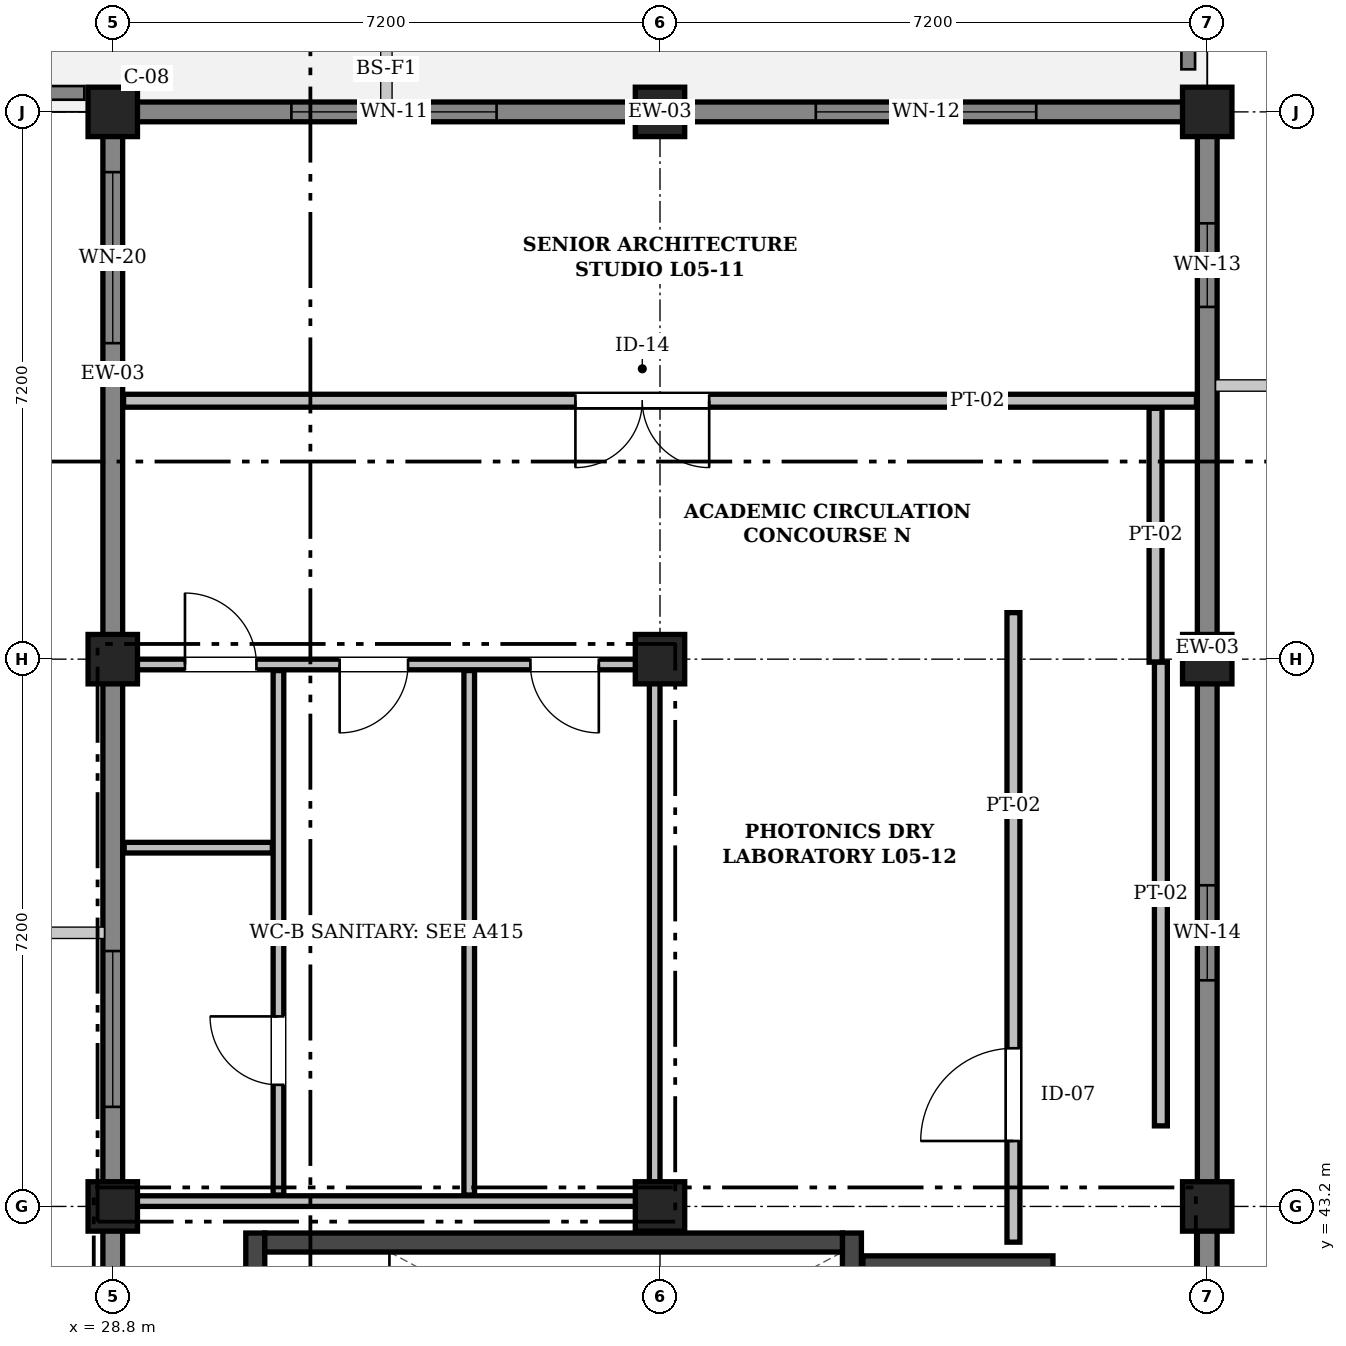
"""IFC4 building model, lengths in metres.
Left out: names, types, materials, properties, quantities, classifications, styles, units other than length and angle.
Written with IfcOpenShell. Run it as: python <this file> out.ifc"""

import sys

from ifc_helpers import new_model, si_unit, direction, frame, frame_2d, origin, origin_2d, place, context, subcontext, project, spatial, rectangle, extrude, element, fill, save


model = new_model("IFC4")
c1 = context("Model", 3, precision=1e-05, world=origin(), true_north=direction((0.0, 1.0)))
c2 = subcontext(c1, "Body", "Model", "MODEL_VIEW")
j1 = project(units=[si_unit("LENGTHUNIT", "METRE"), si_unit("PLANEANGLEUNIT", "RADIAN")], contexts=[c1])
p1 = place(None, origin())
s1 = spatial("IfcSite", under=j1, at=p1, CompositionType="ELEMENT")
p2 = place(p1, origin())
s2 = spatial("IfcBuilding", under=s1, at=p2, CompositionType="ELEMENT")
p3 = place(p2, frame((0.0, 0.0, 23.4)))
s3 = spatial("IfcBuildingStorey", under=s2, at=p3, CompositionType="ELEMENT", Elevation=23.4)
for number, where, z_axis, x_axis in (
    (1, (28.8, 43.2, 0.0), (0.0, 0.0, 1.0), (1.0, 0.0, 0.0)),
    (2, (28.8, 50.4, 0.0), (0.0, 0.0, 1.0), (1.0, 0.0, 0.0)),
    (3, (28.8, 57.6, 0.0), (0.0, 0.0, 1.0), (1.0, 0.0, 0.0)),
    (4, (36.0, 43.2, 0.0), (0.0, 0.0, 1.0), (1.0, 0.0, 0.0)),
    (5, (36.0, 50.4, 0.0), (0.0, 0.0, 1.0), (1.0, 0.0, 0.0)),
    (6, (36.0, 57.6, 0.0), (0.0, 0.0, 1.0), (1.0, 0.0, 0.0)),
    (7, (43.2, 43.2, 0.0), (0.0, 0.0, 1.0), (1.0, 0.0, 0.0)),
    (8, (43.2, 50.4, 0.0), (0.0, 0.0, 1.0), (1.0, 0.0, 0.0)),
    (9, (43.2, 57.6, 0.0), (0.0, 0.0, 1.0), (1.0, 0.0, 0.0)),
):
    element("IfcColumn", number, at=place(p3, frame(where, z_axis=z_axis, x_axis=x_axis)), inside=s3, PredefinedType="COLUMN", context=c2, shape_type="SweptSolid", body=[
        extrude(rectangle(XDim=0.65, YDim=0.65, at=origin_2d()), origin(), (0.0, 0.0, 1.0), 4.5),
    ])
p4 = place(p3, frame((28.65, 57.6, 0.0), z_axis=(0.0, 0.0, 1.0), x_axis=(1.0, 0.0, 0.0)))
e10 = element("IfcWall", 10, at=p4, inside=s3, PredefinedType="SOLIDWALL", context=c2, shape_type="SweptSolid", body=[
    extrude(rectangle(XDim=7.35, YDim=0.26, at=frame_2d((3.675, 0.0))), origin(), (0.0, 0.0, 1.0), 4.22),
])
p5 = place(p4, frame((2.5, 0.0, 0.95)))
e11 = element("IfcOpeningElement", 11, at=p5, cuts=e10, PredefinedType="OPENING", context=c2, shape_type="SweptSolid", body=[
    extrude(rectangle(XDim=2.7, YDim=1.3, at=frame_2d((1.35, 0.65))), frame((0.0, 0.142, 0.0), z_axis=(0.0, -1.0, 0.0), x_axis=(1.0, 0.0, 0.0)), (0.0, 0.0, 1.0), 0.284),
])
p6 = place(p3, frame((36.0, 57.6, 0.0), z_axis=(0.0, 0.0, 1.0), x_axis=(1.0, 0.0, 0.0)))
e12 = element("IfcWall", 12, at=p6, inside=s3, PredefinedType="SOLIDWALL", context=c2, shape_type="SweptSolid", body=[
    extrude(rectangle(XDim=7.35, YDim=0.26, at=frame_2d((3.675, 0.0))), origin(), (0.0, 0.0, 1.0), 4.22),
])
p7 = place(p6, frame((2.05, 0.0, 0.95)))
e13 = element("IfcOpeningElement", 13, at=p7, cuts=e12, PredefinedType="OPENING", context=c2, shape_type="SweptSolid", body=[
    extrude(rectangle(XDim=2.9, YDim=1.3, at=frame_2d((1.45, 0.65))), frame((0.0, 0.142, 0.0), z_axis=(0.0, -1.0, 0.0), x_axis=(1.0, 0.0, 0.0)), (0.0, 0.0, 1.0), 0.284),
])
p8 = place(p3, frame((43.2, 57.448, 0.0), z_axis=(0.0, 0.0, 1.0), x_axis=(0.0, -1.0, 0.0)))
e14 = element("IfcWall", 14, at=p8, inside=s3, PredefinedType="SOLIDWALL", context=c2, shape_type="SweptSolid", body=[
    extrude(rectangle(XDim=7.048, YDim=0.26, at=frame_2d((3.524, 0.0))), origin(), (0.0, 0.0, 1.0), 4.22),
])
p9 = place(p8, frame((1.314, 0.0, 0.95)))
e15 = element("IfcOpeningElement", 15, at=p9, cuts=e14, PredefinedType="OPENING", context=c2, shape_type="SweptSolid", body=[
    extrude(rectangle(XDim=1.1, YDim=1.55, at=frame_2d((0.55, 0.775))), frame((0.0, 0.142, 0.0), z_axis=(0.0, -1.0, 0.0), x_axis=(1.0, 0.0, 0.0)), (0.0, 0.0, 1.0), 0.284),
])
p10 = place(p3, frame((43.2, 50.4, 0.0), z_axis=(0.0, 0.0, 1.0), x_axis=(0.0, -1.0, 0.0)))
e16 = element("IfcWall", 16, at=p10, inside=s3, PredefinedType="SOLIDWALL", context=c2, shape_type="SweptSolid", body=[
    extrude(rectangle(XDim=7.2, YDim=0.26, at=frame_2d((3.6, 0.0))), origin(), (0.0, 0.0, 1.0), 4.22),
])
p11 = place(p10, frame((2.975, 0.0, 0.95)))
e17 = element("IfcOpeningElement", 17, at=p11, cuts=e16, PredefinedType="OPENING", context=c2, shape_type="SweptSolid", body=[
    extrude(rectangle(XDim=1.25, YDim=1.55, at=frame_2d((0.625, 0.775))), frame((0.0, 0.142, 0.0), z_axis=(0.0, -1.0, 0.0), x_axis=(1.0, 0.0, 0.0)), (0.0, 0.0, 1.0), 0.284),
])
p12 = place(p3, frame((43.2, 43.2, 0.0), z_axis=(0.0, 0.0, 1.0), x_axis=(0.0, -1.0, 0.0)))
e18 = element("IfcWall", 18, at=p12, inside=s3, PredefinedType="SOLIDWALL", context=c2, shape_type="SweptSolid", body=[
    extrude(rectangle(XDim=7.2, YDim=0.26, at=frame_2d((3.6, 0.0))), origin(), (0.0, 0.0, 1.0), 4.22),
])
p13 = place(p12, frame((2.9, 0.0, 0.95)))
e19 = element("IfcOpeningElement", 19, at=p13, cuts=e18, PredefinedType="OPENING", context=c2, shape_type="SweptSolid", body=[
    extrude(rectangle(XDim=1.4, YDim=1.55, at=frame_2d((0.7, 0.775))), frame((0.0, 0.142, 0.0), z_axis=(0.0, -1.0, 0.0), x_axis=(1.0, 0.0, 0.0)), (0.0, 0.0, 1.0), 0.284),
])
p14 = place(p3, frame((28.8, 36.0, 0.0), z_axis=(0.0, 0.0, 1.0), x_axis=(0.0, 1.0, 0.0)))
e20 = element("IfcWall", 20, at=p14, inside=s3, PredefinedType="SOLIDWALL", context=c2, shape_type="SweptSolid", body=[
    extrude(rectangle(XDim=7.2, YDim=0.26, at=frame_2d((3.6, 0.0))), origin(), (0.0, 0.0, 1.0), 4.22),
])
p15 = place(p14, frame((2.94, 0.0, 0.0)))
e21 = element("IfcOpeningElement", 21, at=p15, cuts=e20, PredefinedType="OPENING", context=c2, shape_type="SweptSolid", body=[
    extrude(rectangle(XDim=1.32, YDim=2.2, at=frame_2d((0.66, 1.1))), frame((0.0, 0.142, 0.0), z_axis=(0.0, -1.0, 0.0), x_axis=(1.0, 0.0, 0.0)), (0.0, 0.0, 1.0), 0.284),
])
p16 = place(p3, frame((28.8, 43.2, 0.0), z_axis=(0.0, 0.0, 1.0), x_axis=(0.0, 1.0, 0.0)))
e22 = element("IfcWall", 22, at=p16, inside=s3, PredefinedType="SOLIDWALL", context=c2, shape_type="SweptSolid", body=[
    extrude(rectangle(XDim=7.2, YDim=0.26, at=frame_2d((3.6, 0.0))), origin(), (0.0, 0.0, 1.0), 4.22),
])
p17 = place(p16, frame((1.31, 0.0, 0.95)))
e23 = element("IfcOpeningElement", 23, at=p17, cuts=e22, PredefinedType="OPENING", context=c2, shape_type="SweptSolid", body=[
    extrude(rectangle(XDim=2.05, YDim=1.55, at=frame_2d((1.025, 0.775))), frame((0.0, 0.142, 0.0), z_axis=(0.0, -1.0, 0.0), x_axis=(1.0, 0.0, 0.0)), (0.0, 0.0, 1.0), 0.284),
])
p18 = place(p3, frame((28.8, 50.4, 0.0), z_axis=(0.0, 0.0, 1.0), x_axis=(0.0, 1.0, 0.0)))
e24 = element("IfcWall", 24, at=p18, inside=s3, PredefinedType="SOLIDWALL", context=c2, shape_type="SweptSolid", body=[
    extrude(rectangle(XDim=7.048, YDim=0.26, at=frame_2d((3.524, 0.0))), origin(), (0.0, 0.0, 1.0), 4.22),
])
p19 = place(p18, frame((4.157, 0.0, 0.95)))
e25 = element("IfcOpeningElement", 25, at=p19, cuts=e24, PredefinedType="OPENING", context=c2, shape_type="SweptSolid", body=[
    extrude(rectangle(XDim=2.25, YDim=1.55, at=frame_2d((1.125, 0.775))), frame((0.0, 0.142, 0.0), z_axis=(0.0, -1.0, 0.0), x_axis=(1.0, 0.0, 0.0)), (0.0, 0.0, 1.0), 0.284),
])
p20 = place(p3, frame((42.95, 65.496, 0.0), z_axis=(0.0, 0.0, 1.0), x_axis=(0.0, -1.0, 0.0)))
e26 = element("IfcWall", 26, at=p20, inside=s3, PredefinedType="PARAPET", context=c2, shape_type="SweptSolid", body=[
    extrude(rectangle(XDim=7.336, YDim=0.18, at=frame_2d((3.668, 0.0))), origin(), (0.0, 0.0, 1.0), 0.95),
])
p21 = place(p3, frame((28.426, 57.85, 0.0), z_axis=(0.0, 0.0, 1.0), x_axis=(-1.0, 0.0, 0.0)))
e27 = element("IfcWall", 27, at=p21, inside=s3, PredefinedType="PARAPET", context=c2, shape_type="SweptSolid", body=[
    extrude(rectangle(XDim=2.976, YDim=0.18, at=frame_2d((1.488, 0.0))), origin(), (0.0, 0.0, 1.0), 0.95),
])
p22 = place(p3, frame((38.67, 42.4, 0.0), z_axis=(0.0, 0.0, 1.0), x_axis=(1.0, 0.0, 0.0)))
e28 = element("IfcWall", 28, at=p22, inside=s3, PredefinedType="SHEAR", context=c2, shape_type="SweptSolid", body=[
    extrude(rectangle(XDim=2.5, YDim=0.3, at=frame_2d((1.25, 0.0))), origin(), (0.0, 0.0, 1.0), 5.49),
])
p23 = place(p3, frame((30.675, 39.15, 0.0), z_axis=(0.0, 0.0, 1.0), x_axis=(0.0, 1.0, 0.0)))
e29 = element("IfcWall", 29, at=p23, inside=s3, PredefinedType="SHEAR", context=c2, shape_type="SweptSolid", body=[
    extrude(rectangle(XDim=3.7, YDim=0.25, at=frame_2d((1.85, 0.0))), origin(), (0.0, 0.0, 1.0), 4.25),
])
p24 = place(p23, frame((1.25, 0.0, 0.0)))
e30 = element("IfcOpeningElement", 30, at=p24, cuts=e29, PredefinedType="OPENING", context=c2, shape_type="SweptSolid", body=[
    extrude(rectangle(XDim=1.2, YDim=2.15, at=frame_2d((0.6, 1.075))), frame((0.0, 0.137, 0.0), z_axis=(0.0, -1.0, 0.0), x_axis=(1.0, 0.0, 0.0)), (0.0, 0.0, 1.0), 0.274),
])
p25 = place(p3, frame((38.525, 39.15, 0.0), z_axis=(0.0, 0.0, 1.0), x_axis=(0.0, 1.0, 0.0)))
e31 = element("IfcWall", 31, at=p25, inside=s3, PredefinedType="SHEAR", context=c2, shape_type="SweptSolid", body=[
    extrude(rectangle(XDim=3.7, YDim=0.25, at=frame_2d((1.85, 0.0))), origin(), (0.0, 0.0, 1.0), 4.25),
])
p26 = place(p3, frame((30.8, 42.725, 0.0), z_axis=(0.0, 0.0, 1.0), x_axis=(1.0, 0.0, 0.0)))
e32 = element("IfcWall", 32, at=p26, inside=s3, PredefinedType="SHEAR", context=c2, shape_type="SweptSolid", body=[
    extrude(rectangle(XDim=7.6, YDim=0.25, at=frame_2d((3.8, 0.0))), origin(), (0.0, 0.0, 1.0), 4.25),
])
p27 = place(p3, frame((29.0, 43.27, 0.0), z_axis=(0.0, 0.0, 1.0), x_axis=(1.0, 0.0, 0.0)))
e33 = element("IfcWall", 33, at=p27, inside=s3, PredefinedType="PARTITIONING", context=c2, shape_type="SweptSolid", body=[
    extrude(rectangle(XDim=6.93, YDim=0.14, at=frame_2d((3.465, 0.0))), origin(), (0.0, 0.0, 1.0), 3.73),
])
p28 = place(p3, frame((29.0, 50.33, 0.0), z_axis=(0.0, 0.0, 1.0), x_axis=(1.0, 0.0, 0.0)))
e34 = element("IfcWall", 34, at=p28, inside=s3, PredefinedType="PARTITIONING", context=c2, shape_type="SweptSolid", body=[
    extrude(rectangle(XDim=6.93, YDim=0.14, at=frame_2d((3.465, 0.0))), origin(), (0.0, 0.0, 1.0), 3.73),
])
p29 = place(p28, frame((0.75, 0.0, 0.0)))
e35 = element("IfcOpeningElement", 35, at=p29, cuts=e34, PredefinedType="OPENING", context=c2, shape_type="SweptSolid", body=[
    extrude(rectangle(XDim=0.94, YDim=2.1, at=frame_2d((0.47, 1.05))), frame((0.0, 0.082, 0.0), z_axis=(0.0, -1.0, 0.0), x_axis=(1.0, 0.0, 0.0)), (0.0, 0.0, 1.0), 0.164),
])
p30 = place(p28, frame((2.785, 0.0, 0.0)))
e36 = element("IfcOpeningElement", 36, at=p30, cuts=e34, PredefinedType="OPENING", context=c2, shape_type="SweptSolid", body=[
    extrude(rectangle(XDim=0.9, YDim=2.08, at=frame_2d((0.45, 1.04))), frame((0.0, 0.082, 0.0), z_axis=(0.0, -1.0, 0.0), x_axis=(1.0, 0.0, 0.0)), (0.0, 0.0, 1.0), 0.164),
])
p31 = place(p28, frame((5.295, 0.0, 0.0)))
e37 = element("IfcOpeningElement", 37, at=p31, cuts=e34, PredefinedType="OPENING", context=c2, shape_type="SweptSolid", body=[
    extrude(rectangle(XDim=0.9, YDim=2.08, at=frame_2d((0.45, 1.04))), frame((0.0, 0.082, 0.0), z_axis=(0.0, -1.0, 0.0), x_axis=(1.0, 0.0, 0.0)), (0.0, 0.0, 1.0), 0.164),
])
p32 = place(p3, frame((35.93, 43.35, 0.0), z_axis=(0.0, 0.0, 1.0), x_axis=(0.0, 1.0, 0.0)))
e38 = element("IfcWall", 38, at=p32, inside=s3, PredefinedType="PARTITIONING", context=c2, shape_type="SweptSolid", body=[
    extrude(rectangle(XDim=6.9, YDim=0.14, at=frame_2d((3.45, 0.0))), origin(), (0.0, 0.0, 1.0), 3.73),
])
p33 = place(p3, frame((30.98, 43.35, 0.0), z_axis=(0.0, 0.0, 1.0), x_axis=(0.0, 1.0, 0.0)))
e39 = element("IfcWall", 39, at=p33, inside=s3, PredefinedType="PARTITIONING", context=c2, shape_type="SweptSolid", body=[
    extrude(rectangle(XDim=6.9, YDim=0.14, at=frame_2d((3.45, 0.0))), origin(), (0.0, 0.0, 1.0), 4.16),
])
p34 = place(p33, frame((1.45, 0.0, 0.0)))
e40 = element("IfcOpeningElement", 40, at=p34, cuts=e39, PredefinedType="OPENING", context=c2, shape_type="SweptSolid", body=[
    extrude(rectangle(XDim=0.9, YDim=2.08, at=frame_2d((0.45, 1.04))), frame((0.0, 0.082, 0.0), z_axis=(0.0, -1.0, 0.0), x_axis=(1.0, 0.0, 0.0)), (0.0, 0.0, 1.0), 0.164),
])
p35 = place(p3, frame((33.49, 43.35, 0.0), z_axis=(0.0, 0.0, 1.0), x_axis=(0.0, 1.0, 0.0)))
e41 = element("IfcWall", 41, at=p35, inside=s3, PredefinedType="PARTITIONING", context=c2, shape_type="SweptSolid", body=[
    extrude(rectangle(XDim=6.9, YDim=0.14, at=frame_2d((3.45, 0.0))), origin(), (0.0, 0.0, 1.0), 4.16),
])
p36 = place(p3, frame((28.95, 47.92, 0.0), z_axis=(0.0, 0.0, 1.0), x_axis=(1.0, 0.0, 0.0)))
e42 = element("IfcWall", 42, at=p36, inside=s3, PredefinedType="PARTITIONING", context=c2, shape_type="SweptSolid", body=[
    extrude(rectangle(XDim=1.95, YDim=0.14, at=frame_2d((0.975, 0.0))), origin(), (0.0, 0.0, 1.0), 4.16),
])
p37 = place(p3, frame((28.942, 53.8, 0.0), z_axis=(0.0, 0.0, 1.0), x_axis=(1.0, 0.0, 0.0)))
e43 = element("IfcWall", 43, at=p37, inside=s3, PredefinedType="PARTITIONING", context=c2, shape_type="SweptSolid", body=[
    extrude(rectangle(XDim=14.116, YDim=0.17, at=frame_2d((7.058, 0.0))), origin(), (0.0, 0.0, 1.0), 4.16),
])
p38 = place(p37, frame((5.945, 0.0, 0.0)))
e44 = element("IfcOpeningElement", 44, at=p38, cuts=e43, PredefinedType="OPENING", context=c2, shape_type="SweptSolid", body=[
    extrude(rectangle(XDim=1.76, YDim=2.3, at=frame_2d((0.88, 1.15))), frame((0.0, 0.097, 0.0), z_axis=(0.0, -1.0, 0.0), x_axis=(1.0, 0.0, 0.0)), (0.0, 0.0, 1.0), 0.194),
])
p39 = place(p3, frame((42.52, 50.36, 0.0), z_axis=(0.0, 0.0, 1.0), x_axis=(0.0, 1.0, 0.0)))
e45 = element("IfcWall", 45, at=p39, inside=s3, PredefinedType="PARTITIONING", context=c2, shape_type="SweptSolid", body=[
    extrude(rectangle(XDim=3.34, YDim=0.17, at=frame_2d((1.67, 0.0))), origin(), (0.0, 0.0, 1.0), 4.16),
])
p40 = place(p3, frame((42.59, 44.26, 0.0), z_axis=(0.0, 0.0, 1.0), x_axis=(0.0, 1.0, 0.0)))
e46 = element("IfcWall", 46, at=p40, inside=s3, PredefinedType="PARTITIONING", context=c2, shape_type="SweptSolid", body=[
    extrude(rectangle(XDim=6.1, YDim=0.17, at=frame_2d((3.05, 0.0))), origin(), (0.0, 0.0, 1.0), 4.16),
])
p41 = place(p3, frame((40.65, 42.73, 0.0), z_axis=(0.0, 0.0, 1.0), x_axis=(0.0, 1.0, 0.0)))
e47 = element("IfcWall", 47, at=p41, inside=s3, PredefinedType="PARTITIONING", context=c2, shape_type="SweptSolid", body=[
    extrude(rectangle(XDim=8.282, YDim=0.17, at=frame_2d((4.141, 0.0))), origin(), (0.0, 0.0, 1.0), 4.16),
])
p42 = place(p41, frame((1.331, 0.0, 0.0)))
e48 = element("IfcOpeningElement", 48, at=p42, cuts=e47, PredefinedType="OPENING", context=c2, shape_type="SweptSolid", body=[
    extrude(rectangle(XDim=1.22, YDim=2.22, at=frame_2d((0.61, 1.11))), frame((0.0, 0.097, 0.0), z_axis=(0.0, -1.0, 0.0), x_axis=(1.0, 0.0, 0.0)), (0.0, 0.0, 1.0), 0.194),
])
p43 = place(p5, origin())
e49 = element("IfcWindow", 49, at=p43, inside=s3, PartitioningType="SINGLE_PANEL", PredefinedType="WINDOW", context=c2, shape_type="SweptSolid", body=[
    extrude(rectangle(XDim=2.7, YDim=1.3, at=frame_2d((1.35, 0.65))), frame((0.0, 0.03, 0.0), z_axis=(0.0, -1.0, 0.0), x_axis=(1.0, 0.0, 0.0)), (0.0, 0.0, 1.0), 0.06),
])
fill(e11, e49)
p44 = place(p7, origin())
e50 = element("IfcWindow", 50, at=p44, inside=s3, PartitioningType="SINGLE_PANEL", PredefinedType="WINDOW", context=c2, shape_type="SweptSolid", body=[
    extrude(rectangle(XDim=2.9, YDim=1.3, at=frame_2d((1.45, 0.65))), frame((0.0, 0.03, 0.0), z_axis=(0.0, -1.0, 0.0), x_axis=(1.0, 0.0, 0.0)), (0.0, 0.0, 1.0), 0.06),
])
fill(e13, e50)
p45 = place(p9, origin())
e51 = element("IfcWindow", 51, at=p45, inside=s3, PartitioningType="SINGLE_PANEL", PredefinedType="WINDOW", context=c2, shape_type="SweptSolid", body=[
    extrude(rectangle(XDim=1.1, YDim=1.55, at=frame_2d((0.55, 0.775))), frame((0.0, 0.03, 0.0), z_axis=(0.0, -1.0, 0.0), x_axis=(1.0, 0.0, 0.0)), (0.0, 0.0, 1.0), 0.06),
])
fill(e15, e51)
p46 = place(p11, origin())
e52 = element("IfcWindow", 52, at=p46, inside=s3, PartitioningType="SINGLE_PANEL", PredefinedType="WINDOW", context=c2, shape_type="SweptSolid", body=[
    extrude(rectangle(XDim=1.25, YDim=1.55, at=frame_2d((0.625, 0.775))), frame((0.0, 0.03, 0.0), z_axis=(0.0, -1.0, 0.0), x_axis=(1.0, 0.0, 0.0)), (0.0, 0.0, 1.0), 0.06),
])
fill(e17, e52)
p47 = place(p17, origin())
e53 = element("IfcWindow", 53, at=p47, inside=s3, PartitioningType="SINGLE_PANEL", PredefinedType="WINDOW", context=c2, shape_type="SweptSolid", body=[
    extrude(rectangle(XDim=2.05, YDim=1.55, at=frame_2d((1.025, 0.775))), frame((0.0, 0.03, 0.0), z_axis=(0.0, -1.0, 0.0), x_axis=(1.0, 0.0, 0.0)), (0.0, 0.0, 1.0), 0.06),
])
fill(e23, e53)
p48 = place(p19, origin())
e54 = element("IfcWindow", 54, at=p48, inside=s3, PartitioningType="SINGLE_PANEL", PredefinedType="WINDOW", context=c2, shape_type="SweptSolid", body=[
    extrude(rectangle(XDim=2.25, YDim=1.55, at=frame_2d((1.125, 0.775))), frame((0.0, 0.03, 0.0), z_axis=(0.0, -1.0, 0.0), x_axis=(1.0, 0.0, 0.0)), (0.0, 0.0, 1.0), 0.06),
])
fill(e25, e54)
p49 = place(p29, origin())
e55 = element("IfcDoor", 55, at=p49, inside=s3, OperationType="SINGLE_SWING_LEFT", PredefinedType="DOOR", context=c2, shape_type="SweptSolid", body=[
    extrude(rectangle(XDim=0.94, YDim=2.1, at=frame_2d((0.47, 1.05))), frame((0.0, 0.025, 0.0), z_axis=(0.0, -1.0, 0.0), x_axis=(1.0, 0.0, 0.0)), (0.0, 0.0, 1.0), 0.05),
])
fill(e35, e55)
p50 = place(p30, frame((0.9, 0.0, 0.0), z_axis=(0.0, 0.0, 1.0), x_axis=(-1.0, 0.0, 0.0)))
e56 = element("IfcDoor", 56, at=p50, inside=s3, OperationType="SINGLE_SWING_RIGHT", PredefinedType="DOOR", context=c2, shape_type="SweptSolid", body=[
    extrude(rectangle(XDim=0.9, YDim=2.08, at=frame_2d((0.45, 1.04))), frame((0.0, 0.025, 0.0), z_axis=(0.0, -1.0, 0.0), x_axis=(1.0, 0.0, 0.0)), (0.0, 0.0, 1.0), 0.05),
])
fill(e36, e56)
p51 = place(p31, frame((0.9, 0.0, 0.0), z_axis=(0.0, 0.0, 1.0), x_axis=(-1.0, 0.0, 0.0)))
e57 = element("IfcDoor", 57, at=p51, inside=s3, OperationType="SINGLE_SWING_LEFT", PredefinedType="DOOR", context=c2, shape_type="SweptSolid", body=[
    extrude(rectangle(XDim=0.9, YDim=2.08, at=frame_2d((0.45, 1.04))), frame((0.0, 0.025, 0.0), z_axis=(0.0, -1.0, 0.0), x_axis=(1.0, 0.0, 0.0)), (0.0, 0.0, 1.0), 0.05),
])
fill(e37, e57)
p52 = place(p34, origin())
e58 = element("IfcDoor", 58, at=p52, inside=s3, OperationType="SINGLE_SWING_RIGHT", PredefinedType="DOOR", context=c2, shape_type="SweptSolid", body=[
    extrude(rectangle(XDim=0.9, YDim=2.08, at=frame_2d((0.45, 1.04))), frame((0.0, 0.025, 0.0), z_axis=(0.0, -1.0, 0.0), x_axis=(1.0, 0.0, 0.0)), (0.0, 0.0, 1.0), 0.05),
])
fill(e40, e58)
p53 = place(p38, frame((1.76, 0.0, 0.0), z_axis=(0.0, 0.0, 1.0), x_axis=(-1.0, 0.0, 0.0)))
e59 = element("IfcDoor", 59, at=p53, inside=s3, OperationType="DOUBLE_DOOR_SINGLE_SWING", PredefinedType="DOOR", context=c2, shape_type="SweptSolid", body=[
    extrude(rectangle(XDim=1.76, YDim=2.3, at=frame_2d((0.88, 1.15))), frame((0.0, 0.025, 0.0), z_axis=(0.0, -1.0, 0.0), x_axis=(1.0, 0.0, 0.0)), (0.0, 0.0, 1.0), 0.05),
])
fill(e44, e59)
p54 = place(p42, origin())
e60 = element("IfcDoor", 60, at=p54, inside=s3, OperationType="SINGLE_SWING_LEFT", PredefinedType="DOOR", context=c2, shape_type="SweptSolid", body=[
    extrude(rectangle(XDim=1.22, YDim=2.22, at=frame_2d((0.61, 1.11))), frame((0.0, 0.025, 0.0), z_axis=(0.0, -1.0, 0.0), x_axis=(1.0, 0.0, 0.0)), (0.0, 0.0, 1.0), 0.05),
])
fill(e48, e60)
save(model, sys.argv[1])
